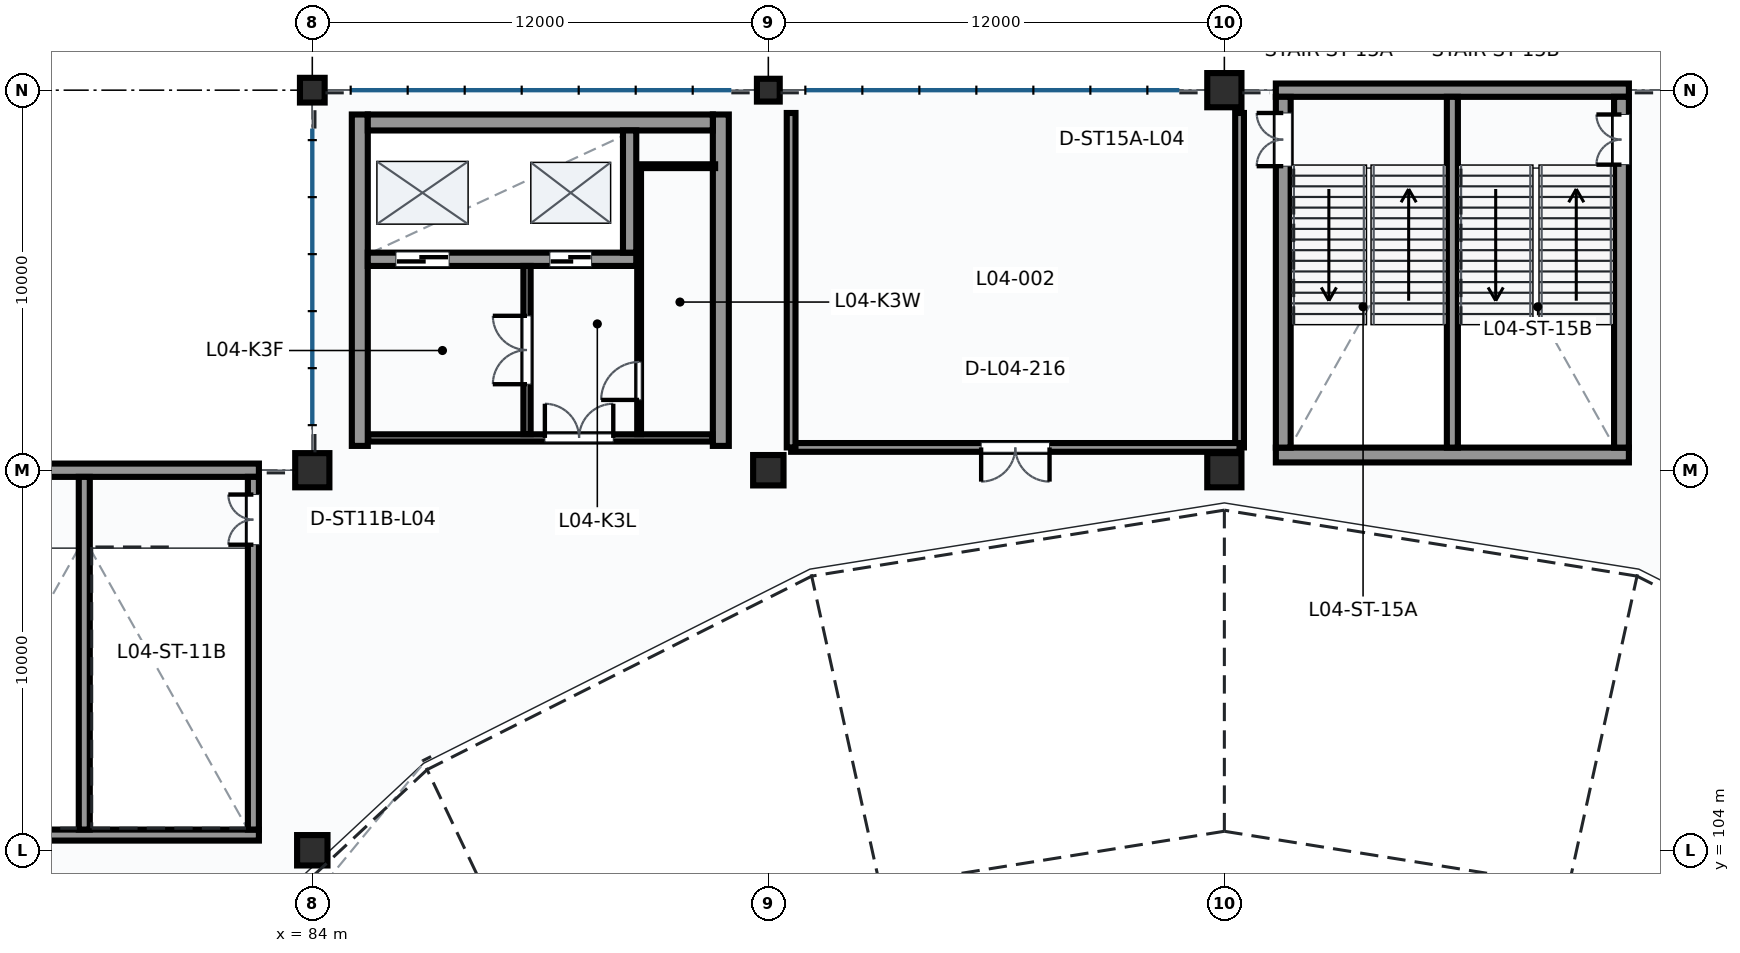
"""IFC4 building model, lengths in metres.
Left out: names, types, materials, properties, quantities, classifications, styles, units other than length and angle.
Written with IfcOpenShell. Run it as: python <this file> out.ifc"""

import sys

from ifc_helpers import new_model, si_unit, direction, frame, frame_2d, origin, origin_2d, place, context, subcontext, project, spatial, rectangle, circle, extrude, element, fill, save


model = new_model("IFC4")
c1 = context("Model", 3, precision=1e-05, world=origin(), true_north=direction((0.0, 1.0)))
c2 = subcontext(c1, "Body", "Model", "MODEL_VIEW")
j1 = project(units=[si_unit("LENGTHUNIT", "METRE"), si_unit("PLANEANGLEUNIT", "RADIAN")], contexts=[c1])
p1 = place(None, origin())
s1 = spatial("IfcSite", under=j1, at=p1, CompositionType="ELEMENT")
p2 = place(p1, origin())
s2 = spatial("IfcBuilding", under=s1, at=p2, CompositionType="ELEMENT")
p3 = place(p2, frame((0.0, 0.0, 19.2)))
s3 = spatial("IfcBuildingStorey", under=s2, at=p3, CompositionType="ELEMENT", Elevation=19.2)
p4 = place(p3, frame((84.0, 104.0, 0.0), z_axis=(0.0, 0.0, 1.0), x_axis=(1.0, 0.0, 0.0)))
e1 = element("IfcColumn", 1, at=p4, inside=s3, PredefinedType="COLUMN", context=c2, shape_type="SweptSolid", body=[
    extrude(circle(Radius=0.4, at=origin_2d()), origin(), (0.0, 0.0, 1.0), 5.4),
])
p5 = place(p3, frame((84.0, 114.0, 0.0), z_axis=(0.0, 0.0, 1.0), x_axis=(1.0, 0.0, 0.0)))
e2 = element("IfcColumn", 2, at=p5, inside=s3, PredefinedType="COLUMN", context=c2, shape_type="SweptSolid", body=[
    extrude(rectangle(XDim=0.9, YDim=0.9, at=origin_2d()), origin(), (0.0, 0.0, 1.0), 5.4),
])
p6 = place(p3, frame((84.0, 124.0, 0.0), z_axis=(0.0, 0.0, 1.0), x_axis=(1.0, 0.0, 0.0)))
e3 = element("IfcColumn", 3, at=p6, inside=s3, PredefinedType="COLUMN", context=c2, shape_type="SweptSolid", body=[
    extrude(rectangle(XDim=0.65, YDim=0.65, at=origin_2d()), origin(), (0.0, 0.0, 1.0), 5.4),
])
p7 = place(p3, frame((96.0, 114.0, 0.0), z_axis=(0.0, 0.0, 1.0), x_axis=(1.0, 0.0, 0.0)))
e4 = element("IfcColumn", 4, at=p7, inside=s3, PredefinedType="COLUMN", context=c2, shape_type="SweptSolid", body=[
    extrude(circle(Radius=0.4, at=origin_2d()), origin(), (0.0, 0.0, 1.0), 5.4),
])
p8 = place(p3, frame((96.0, 124.0, 0.0), z_axis=(0.0, 0.0, 1.0), x_axis=(1.0, 0.0, 0.0)))
e5 = element("IfcColumn", 5, at=p8, inside=s3, PredefinedType="COLUMN", context=c2, shape_type="SweptSolid", body=[
    extrude(rectangle(XDim=0.6, YDim=0.6, at=origin_2d()), origin(), (0.0, 0.0, 1.0), 5.4),
])
p9 = place(p3, frame((108.0, 114.0, 0.0), z_axis=(0.0, 0.0, 1.0), x_axis=(1.0, 0.0, 0.0)))
e6 = element("IfcColumn", 6, at=p9, inside=s3, PredefinedType="COLUMN", context=c2, shape_type="SweptSolid", body=[
    extrude(rectangle(XDim=0.9, YDim=0.9, at=origin_2d()), origin(), (0.0, 0.0, 1.0), 5.4),
])
p10 = place(p3, frame((108.0, 124.0, 0.0), z_axis=(0.0, 0.0, 1.0), x_axis=(1.0, 0.0, 0.0)))
e7 = element("IfcColumn", 7, at=p10, inside=s3, PredefinedType="COLUMN", context=c2, shape_type="SweptSolid", body=[
    extrude(circle(Radius=0.45, at=origin_2d()), origin(), (0.0, 0.0, 1.0), 5.4),
])
p11 = place(p3, frame((73.405, 104.4, 0.0), z_axis=(0.0, 0.0, 1.0), x_axis=(1.0, 0.0, 0.0)))
e8 = element("IfcWall", 8, at=p11, inside=s3, PredefinedType="SHEAR", context=c2, shape_type="SweptSolid", body=[
    extrude(rectangle(XDim=9.19, YDim=0.29, at=frame_2d((4.595, 0.0))), origin(), (0.0, 0.0, 1.0), 5.4),
])
p12 = place(p3, frame((73.405, 114.0, 0.0), z_axis=(0.0, 0.0, 1.0), x_axis=(1.0, 0.0, 0.0)))
e9 = element("IfcWall", 9, at=p12, inside=s3, PredefinedType="SHEAR", context=c2, shape_type="SweptSolid", body=[
    extrude(rectangle(XDim=9.19, YDim=0.35, at=frame_2d((4.595, 0.0))), origin(), (0.0, 0.0, 1.0), 4.584),
])
p13 = place(p3, frame((82.45, 104.545, 0.0), z_axis=(0.0, 0.0, 1.0), x_axis=(0.0, 1.0, 0.0)))
e10 = element("IfcWall", 10, at=p13, inside=s3, PredefinedType="SHEAR", context=c2, shape_type="SweptSolid", body=[
    extrude(rectangle(XDim=9.28, YDim=0.29, at=frame_2d((4.64, 0.0))), origin(), (0.0, 0.0, 1.0), 5.4),
])
p14 = place(p13, frame((7.495, 0.0, 0.0)))
e11 = element("IfcOpeningElement", 11, at=p14, cuts=e10, PredefinedType="OPENING", context=c2, shape_type="SweptSolid", body=[
    extrude(rectangle(XDim=1.32, YDim=2.2, at=frame_2d((0.66, 1.1))), frame((0.0, 0.155, 0.0), z_axis=(0.0, -1.0, 0.0), x_axis=(1.0, 0.0, 0.0)), (0.0, 0.0, 1.0), 0.31),
])
p15 = place(p3, frame((78.0, 104.545, 0.0), z_axis=(0.0, 0.0, 1.0), x_axis=(0.0, 1.0, 0.0)))
e12 = element("IfcWall", 12, at=p15, inside=s3, PredefinedType="SHEAR", context=c2, shape_type="SweptSolid", body=[
    extrude(rectangle(XDim=9.28, YDim=0.29, at=frame_2d((4.64, 0.0))), origin(), (0.0, 0.0, 1.0), 5.4),
])
p16 = place(p3, frame((109.355, 114.4, 0.0), z_axis=(0.0, 0.0, 1.0), x_axis=(1.0, 0.0, 0.0)))
e13 = element("IfcWall", 13, at=p16, inside=s3, PredefinedType="SHEAR", context=c2, shape_type="SweptSolid", body=[
    extrude(rectangle(XDim=9.29, YDim=0.39, at=frame_2d((4.645, 0.0))), origin(), (0.0, 0.0, 1.0), 5.4),
])
p17 = place(p3, frame((109.355, 124.0, 0.0), z_axis=(0.0, 0.0, 1.0), x_axis=(1.0, 0.0, 0.0)))
e14 = element("IfcWall", 14, at=p17, inside=s3, PredefinedType="SHEAR", context=c2, shape_type="SweptSolid", body=[
    extrude(rectangle(XDim=9.29, YDim=0.35, at=frame_2d((4.645, 0.0))), origin(), (0.0, 0.0, 1.0), 4.357),
])
p18 = place(p3, frame((109.55, 114.595, 0.0), z_axis=(0.0, 0.0, 1.0), x_axis=(0.0, 1.0, 0.0)))
e15 = element("IfcWall", 15, at=p18, inside=s3, PredefinedType="SHEAR", context=c2, shape_type="SweptSolid", body=[
    extrude(rectangle(XDim=9.23, YDim=0.39, at=frame_2d((4.615, 0.0))), origin(), (0.0, 0.0, 1.0), 5.4),
])
p19 = place(p18, frame((7.405, 0.0, 0.0)))
e16 = element("IfcOpeningElement", 16, at=p19, cuts=e15, PredefinedType="OPENING", context=c2, shape_type="SweptSolid", body=[
    extrude(rectangle(XDim=1.4, YDim=2.2, at=frame_2d((0.7, 1.1))), frame((0.0, 0.205, 0.0), z_axis=(0.0, -1.0, 0.0), x_axis=(1.0, 0.0, 0.0)), (0.0, 0.0, 1.0), 0.41),
])
p20 = place(p3, frame((118.45, 114.595, 0.0), z_axis=(0.0, 0.0, 1.0), x_axis=(0.0, 1.0, 0.0)))
e17 = element("IfcWall", 17, at=p20, inside=s3, PredefinedType="SHEAR", context=c2, shape_type="SweptSolid", body=[
    extrude(rectangle(XDim=9.23, YDim=0.39, at=frame_2d((4.615, 0.0))), origin(), (0.0, 0.0, 1.0), 5.4),
])
p21 = place(p20, frame((7.445, 0.0, 0.0)))
e18 = element("IfcOpeningElement", 18, at=p21, cuts=e17, PredefinedType="OPENING", context=c2, shape_type="SweptSolid", body=[
    extrude(rectangle(XDim=1.32, YDim=2.2, at=frame_2d((0.66, 1.1))), frame((0.0, 0.205, 0.0), z_axis=(0.0, -1.0, 0.0), x_axis=(1.0, 0.0, 0.0)), (0.0, 0.0, 1.0), 0.41),
])
p22 = place(p3, frame((114.0, 114.595, 0.0), z_axis=(0.0, 0.0, 1.0), x_axis=(0.0, 1.0, 0.0)))
e19 = element("IfcWall", 19, at=p22, inside=s3, PredefinedType="SHEAR", context=c2, shape_type="SweptSolid", body=[
    extrude(rectangle(XDim=9.23, YDim=0.29, at=frame_2d((4.615, 0.0))), origin(), (0.0, 0.0, 1.0), 5.4),
])
for number, where, z_axis, x_axis in (
    (20, (85.25, 114.64, 0.0), (0.0, 0.0, 1.0), (0.0, 1.0, 0.0)),
    (21, (94.75, 114.64, 0.0), (0.0, 0.0, 1.0), (0.0, 1.0, 0.0)),
):
    element("IfcWall", number, at=place(p3, frame(where, z_axis=z_axis, x_axis=x_axis)), inside=s3, PredefinedType="SHEAR", context=c2, shape_type="SweptSolid", body=[
        extrude(rectangle(XDim=8.72, YDim=0.42, at=frame_2d((4.36, 0.0))), origin(), (0.0, 0.0, 1.0), 5.4),
    ])
p23 = place(p3, frame((85.46, 123.15, 0.0), z_axis=(0.0, 0.0, 1.0), x_axis=(1.0, 0.0, 0.0)))
e22 = element("IfcWall", 22, at=p23, inside=s3, PredefinedType="SHEAR", context=c2, shape_type="SweptSolid", body=[
    extrude(rectangle(XDim=9.08, YDim=0.42, at=frame_2d((4.54, 0.0))), origin(), (0.0, 0.0, 1.0), 5.4),
])
p24 = place(p3, frame((85.46, 119.55, 0.0), z_axis=(0.0, 0.0, 1.0), x_axis=(1.0, 0.0, 0.0)))
e23 = element("IfcWall", 23, at=p24, inside=s3, PredefinedType="SHEAR", context=c2, shape_type="SweptSolid", body=[
    extrude(rectangle(XDim=7.065, YDim=0.35, at=frame_2d((3.532, 0.0))), origin(), (0.0, 0.0, 1.0), 5.4),
])
p25 = place(p24, frame((0.74, 0.0, 0.0)))
e24 = element("IfcOpeningElement", 24, at=p25, cuts=e23, PredefinedType="OPENING", context=c2, shape_type="SweptSolid", body=[
    extrude(rectangle(XDim=1.4, YDim=2.3, at=frame_2d((0.7, 1.15))), frame((0.0, 0.185, 0.0), z_axis=(0.0, -1.0, 0.0), x_axis=(1.0, 0.0, 0.0)), (0.0, 0.0, 1.0), 0.37),
])
p26 = place(p24, frame((4.79, 0.0, 0.0)))
e25 = element("IfcOpeningElement", 25, at=p26, cuts=e23, PredefinedType="OPENING", context=c2, shape_type="SweptSolid", body=[
    extrude(rectangle(XDim=1.1, YDim=2.2, at=frame_2d((0.55, 1.1))), frame((0.0, 0.185, 0.0), z_axis=(0.0, -1.0, 0.0), x_axis=(1.0, 0.0, 0.0)), (0.0, 0.0, 1.0), 0.37),
])
p27 = place(p3, frame((92.35, 119.725, 0.0), z_axis=(0.0, 0.0, 1.0), x_axis=(0.0, 1.0, 0.0)))
e26 = element("IfcWall", 26, at=p27, inside=s3, PredefinedType="SHEAR", context=c2, shape_type="SweptSolid", body=[
    extrude(rectangle(XDim=3.215, YDim=0.35, at=frame_2d((1.607, 0.0))), origin(), (0.0, 0.0, 1.0), 5.4),
])
p28 = place(p3, frame((85.47, 114.85, 0.0), z_axis=(0.0, 0.0, 1.0), x_axis=(1.0, 0.0, 0.0)))
e27 = element("IfcWall", 27, at=p28, inside=s3, PredefinedType="PARTITIONING", context=c2, shape_type="SweptSolid", body=[
    extrude(rectangle(XDim=9.06, YDim=0.19, at=frame_2d((4.53, 0.0))), origin(), (0.0, 0.0, 1.0), 5.07),
])
p29 = place(p28, frame((4.65, 0.0, 0.0)))
e28 = element("IfcOpeningElement", 28, at=p29, cuts=e27, PredefinedType="OPENING", context=c2, shape_type="SweptSolid", body=[
    extrude(rectangle(XDim=1.8, YDim=2.3, at=frame_2d((0.9, 1.15))), frame((0.0, 0.105, 0.0), z_axis=(0.0, -1.0, 0.0), x_axis=(1.0, 0.0, 0.0)), (0.0, 0.0, 1.0), 0.21),
])
p30 = place(p3, frame((89.65, 114.95, 0.0), z_axis=(0.0, 0.0, 1.0), x_axis=(0.0, 1.0, 0.0)))
e29 = element("IfcWall", 29, at=p30, inside=s3, PredefinedType="PARTITIONING", context=c2, shape_type="SweptSolid", body=[
    extrude(rectangle(XDim=4.425, YDim=0.19, at=frame_2d((2.212, 0.0))), origin(), (0.0, 0.0, 1.0), 5.07),
])
p31 = place(p30, frame((1.313, 0.0, 0.0)))
e30 = element("IfcOpeningElement", 30, at=p31, cuts=e29, PredefinedType="OPENING", context=c2, shape_type="SweptSolid", body=[
    extrude(rectangle(XDim=1.8, YDim=2.2, at=frame_2d((0.9, 1.1))), frame((0.0, 0.105, 0.0), z_axis=(0.0, -1.0, 0.0), x_axis=(1.0, 0.0, 0.0)), (0.0, 0.0, 1.0), 0.21),
])
p32 = place(p3, frame((92.6, 114.95, 0.0), z_axis=(0.0, 0.0, 1.0), x_axis=(0.0, 1.0, 0.0)))
e31 = element("IfcWall", 31, at=p32, inside=s3, PredefinedType="PARTITIONING", context=c2, shape_type="SweptSolid", body=[
    extrude(rectangle(XDim=7.05, YDim=0.1, at=frame_2d((3.525, 0.0))), origin(), (0.0, 0.0, 1.0), 5.07),
])
p33 = place(p32, frame((0.9, 0.0, 0.0)))
e32 = element("IfcOpeningElement", 32, at=p33, cuts=e31, PredefinedType="OPENING", context=c2, shape_type="SweptSolid", body=[
    extrude(rectangle(XDim=1.0, YDim=2.1, at=frame_2d((0.5, 1.05))), frame((0.0, 0.06, 0.0), z_axis=(0.0, -1.0, 0.0), x_axis=(1.0, 0.0, 0.0)), (0.0, 0.0, 1.0), 0.12),
])
p34 = place(p3, frame((92.6, 122.0, 0.0), z_axis=(0.0, 0.0, 1.0), x_axis=(1.0, 0.0, 0.0)))
e33 = element("IfcWall", 33, at=p34, inside=s3, PredefinedType="PARTITIONING", context=c2, shape_type="SweptSolid", body=[
    extrude(rectangle(XDim=2.0, YDim=0.1, at=frame_2d((1.0, 0.0))), origin(), (0.0, 0.0, 1.0), 5.07),
])
p35 = place(p3, frame((108.4, 123.4, 0.0), z_axis=(0.0, 0.0, 1.0), x_axis=(0.0, -1.0, 0.0)))
e34 = element("IfcWall", 34, at=p35, inside=s3, PredefinedType="SOLIDWALL", context=c2, shape_type="SweptSolid", body=[
    extrude(rectangle(XDim=8.8, YDim=0.23, at=frame_2d((4.4, 0.0))), origin(), (0.0, 0.0, 1.0), 5.07),
])
p36 = place(p3, frame((108.4, 114.6, 0.0), z_axis=(0.0, 0.0, 1.0), x_axis=(-1.0, 0.0, 0.0)))
e35 = element("IfcWall", 35, at=p36, inside=s3, PredefinedType="SOLIDWALL", context=c2, shape_type="SweptSolid", body=[
    extrude(rectangle(XDim=11.8, YDim=0.23, at=frame_2d((5.9, 0.0))), origin(), (0.0, 0.0, 1.0), 4.439),
])
p37 = place(p36, frame((5.0, 0.0, 0.0)))
e36 = element("IfcOpeningElement", 36, at=p37, cuts=e35, PredefinedType="OPENING", context=c2, shape_type="SweptSolid", body=[
    extrude(rectangle(XDim=1.8, YDim=2.3, at=frame_2d((0.9, 1.15))), frame((0.0, 0.125, 0.0), z_axis=(0.0, -1.0, 0.0), x_axis=(1.0, 0.0, 0.0)), (0.0, 0.0, 1.0), 0.25),
])
p38 = place(p3, frame((96.6, 114.6, 0.0), z_axis=(0.0, 0.0, 1.0), x_axis=(0.0, 1.0, 0.0)))
e37 = element("IfcWall", 37, at=p38, inside=s3, PredefinedType="SOLIDWALL", context=c2, shape_type="SweptSolid", body=[
    extrude(rectangle(XDim=8.8, YDim=0.23, at=frame_2d((4.4, 0.0))), origin(), (0.0, 0.0, 1.0), 4.506),
])
p39 = place(p14, origin())
e38 = element("IfcDoor", 38, at=p39, inside=s3, OperationType="DOUBLE_DOOR_SINGLE_SWING", PredefinedType="DOOR", context=c2, shape_type="SweptSolid", body=[
    extrude(rectangle(XDim=1.32, YDim=2.2, at=frame_2d((0.66, 1.1))), frame((0.0, 0.025, 0.0), z_axis=(0.0, -1.0, 0.0), x_axis=(1.0, 0.0, 0.0)), (0.0, 0.0, 1.0), 0.05),
])
fill(e11, e38)
p40 = place(p19, frame((1.4, 0.0, 0.0), z_axis=(0.0, 0.0, 1.0), x_axis=(-1.0, 0.0, 0.0)))
e39 = element("IfcDoor", 39, at=p40, inside=s3, OperationType="DOUBLE_DOOR_SINGLE_SWING", PredefinedType="DOOR", context=c2, shape_type="SweptSolid", body=[
    extrude(rectangle(XDim=1.4, YDim=2.2, at=frame_2d((0.7, 1.1))), frame((0.0, 0.025, 0.0), z_axis=(0.0, -1.0, 0.0), x_axis=(1.0, 0.0, 0.0)), (0.0, 0.0, 1.0), 0.05),
])
fill(e16, e39)
p41 = place(p21, origin())
e40 = element("IfcDoor", 40, at=p41, inside=s3, OperationType="DOUBLE_DOOR_SINGLE_SWING", PredefinedType="DOOR", context=c2, shape_type="SweptSolid", body=[
    extrude(rectangle(XDim=1.32, YDim=2.2, at=frame_2d((0.66, 1.1))), frame((0.0, 0.025, 0.0), z_axis=(0.0, -1.0, 0.0), x_axis=(1.0, 0.0, 0.0)), (0.0, 0.0, 1.0), 0.05),
])
fill(e18, e40)
p42 = place(p25, origin())
e41 = element("IfcDoor", 41, at=p42, inside=s3, OperationType="SLIDING_TO_LEFT", PredefinedType="DOOR", context=c2, shape_type="SweptSolid", body=[
    extrude(rectangle(XDim=1.4, YDim=2.3, at=frame_2d((0.7, 1.15))), frame((0.0, 0.025, 0.0), z_axis=(0.0, -1.0, 0.0), x_axis=(1.0, 0.0, 0.0)), (0.0, 0.0, 1.0), 0.05),
])
fill(e24, e41)
p43 = place(p26, origin())
e42 = element("IfcDoor", 42, at=p43, inside=s3, OperationType="SLIDING_TO_LEFT", PredefinedType="DOOR", context=c2, shape_type="SweptSolid", body=[
    extrude(rectangle(XDim=1.1, YDim=2.2, at=frame_2d((0.55, 1.1))), frame((0.0, 0.025, 0.0), z_axis=(0.0, -1.0, 0.0), x_axis=(1.0, 0.0, 0.0)), (0.0, 0.0, 1.0), 0.05),
])
fill(e25, e42)
p44 = place(p29, origin())
e43 = element("IfcDoor", 43, at=p44, inside=s3, OperationType="DOUBLE_DOOR_SINGLE_SWING", PredefinedType="DOOR", context=c2, shape_type="SweptSolid", body=[
    extrude(rectangle(XDim=1.8, YDim=2.3, at=frame_2d((0.9, 1.15))), frame((0.0, 0.025, 0.0), z_axis=(0.0, -1.0, 0.0), x_axis=(1.0, 0.0, 0.0)), (0.0, 0.0, 1.0), 0.05),
])
fill(e28, e43)
p45 = place(p31, origin())
e44 = element("IfcDoor", 44, at=p45, inside=s3, OperationType="DOUBLE_DOOR_SINGLE_SWING", PredefinedType="DOOR", context=c2, shape_type="SweptSolid", body=[
    extrude(rectangle(XDim=1.8, YDim=2.2, at=frame_2d((0.9, 1.1))), frame((0.0, 0.025, 0.0), z_axis=(0.0, -1.0, 0.0), x_axis=(1.0, 0.0, 0.0)), (0.0, 0.0, 1.0), 0.05),
])
fill(e30, e44)
p46 = place(p33, origin())
e45 = element("IfcDoor", 45, at=p46, inside=s3, OperationType="SINGLE_SWING_LEFT", PredefinedType="DOOR", context=c2, shape_type="SweptSolid", body=[
    extrude(rectangle(XDim=1.0, YDim=2.1, at=frame_2d((0.5, 1.05))), frame((0.0, 0.025, 0.0), z_axis=(0.0, -1.0, 0.0), x_axis=(1.0, 0.0, 0.0)), (0.0, 0.0, 1.0), 0.05),
])
fill(e32, e45)
p47 = place(p37, origin())
e46 = element("IfcDoor", 46, at=p47, inside=s3, OperationType="DOUBLE_DOOR_SINGLE_SWING", PredefinedType="DOOR", context=c2, shape_type="SweptSolid", body=[
    extrude(rectangle(XDim=1.8, YDim=2.3, at=frame_2d((0.9, 1.15))), frame((0.0, 0.025, 0.0), z_axis=(0.0, -1.0, 0.0), x_axis=(1.0, 0.0, 0.0)), (0.0, 0.0, 1.0), 0.05),
])
fill(e36, e46)
save(model, sys.argv[1])
